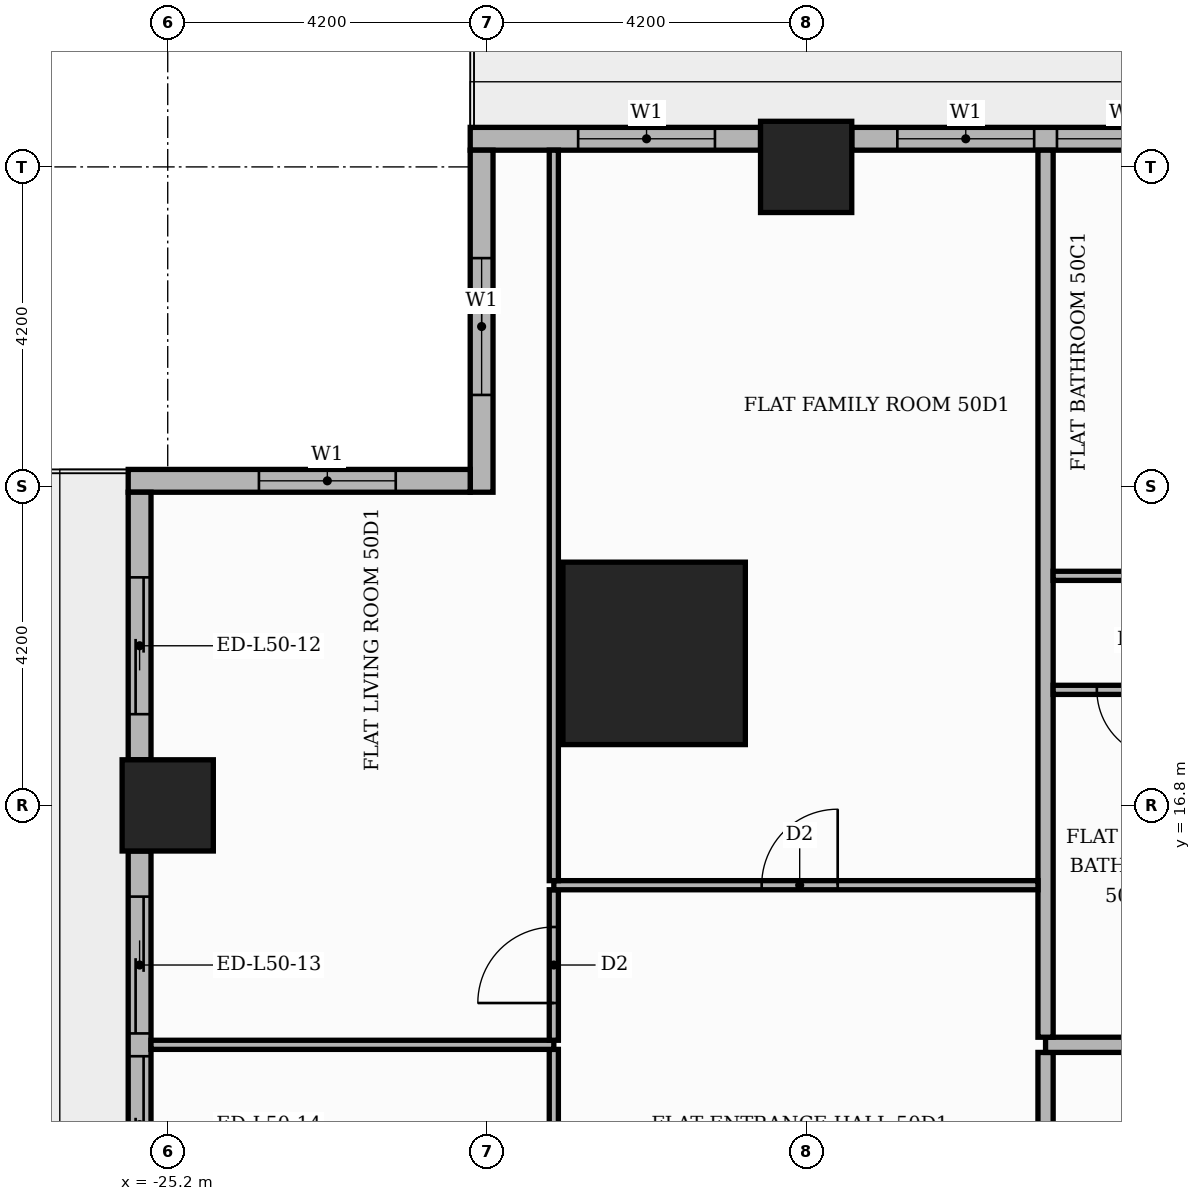
"""IFC4 building model, lengths in metres.
Left out: names, types, materials, properties, quantities, classifications, styles, units other than length and angle.
Written with IfcOpenShell. Run it as: python <this file> out.ifc"""

import sys

from ifc_helpers import new_model, si_unit, direction, frame, frame_2d, origin, origin_2d, place, context, subcontext, project, spatial, rectangle, extrude, element, fill, save


model = new_model("IFC4")
c1 = context("Model", 3, precision=1e-05, world=origin(), true_north=direction((0.0, 1.0)))
c2 = subcontext(c1, "Body", "Model", "MODEL_VIEW")
j1 = project(units=[si_unit("LENGTHUNIT", "METRE"), si_unit("PLANEANGLEUNIT", "RADIAN")], contexts=[c1])
p1 = place(None, origin())
s1 = spatial("IfcSite", under=j1, at=p1, CompositionType="ELEMENT")
p2 = place(p1, origin())
s2 = spatial("IfcBuilding", under=s1, at=p2, CompositionType="ELEMENT")
p3 = place(p2, frame((0.0, 0.0, 211.8)))
s3 = spatial("IfcBuildingStorey", under=s2, at=p3, CompositionType="ELEMENT", Elevation=211.8)
p4 = place(p3, frame((-18.8, 18.8, 0.0), z_axis=(0.0, 0.0, 1.0), x_axis=(1.0, 0.0, 0.0)))
e1 = element("IfcColumn", 1, at=p4, inside=s3, PredefinedType="COLUMN", context=c2, shape_type="SweptSolid", body=[
    extrude(rectangle(XDim=2.4, YDim=2.4, at=origin_2d()), origin(), (0.0, 0.0, 1.0), 3.9),
])
for number, where, z_axis, x_axis in (
    (2, (-16.8, 25.2, 0.0), (0.0, 0.0, 1.0), (1.0, 0.0, 0.0)),
    (3, (-25.2, 16.8, 0.0), (0.0, 0.0, 1.0), (1.0, 0.0, 0.0)),
):
    element("IfcColumn", number, at=place(p3, frame(where, z_axis=z_axis, x_axis=x_axis)), inside=s3, PredefinedType="COLUMN", context=c2, shape_type="SweptSolid", body=[
        extrude(rectangle(XDim=1.2, YDim=1.2, at=origin_2d()), origin(), (0.0, 0.0, 1.0), 3.9),
    ])
p5 = place(p3, frame((-9.0, 25.57, 0.0), z_axis=(0.0, 0.0, 1.0), x_axis=(-1.0, 0.0, 0.0)))
e4 = element("IfcWall", 4, at=p5, inside=s3, PredefinedType="STANDARD", context=c2, shape_type="SweptSolid", body=[
    extrude(rectangle(XDim=7.2, YDim=0.3, at=frame_2d((3.6, 0.0))), origin(), (0.0, 0.0, 1.0), 3.48),
])
p6 = place(p5, frame((0.6, 0.0, 0.9)))
e5 = element("IfcOpeningElement", 5, at=p6, cuts=e4, PredefinedType="OPENING", context=c2, shape_type="SweptSolid", body=[
    extrude(rectangle(XDim=1.8, YDim=2.1, at=frame_2d((0.9, 1.05))), frame((0.0, 0.16, 0.0), z_axis=(0.0, -1.0, 0.0), x_axis=(1.0, 0.0, 0.0)), (0.0, 0.0, 1.0), 0.32),
])
p7 = place(p5, frame((2.7, 0.0, 0.9)))
e6 = element("IfcOpeningElement", 6, at=p7, cuts=e4, PredefinedType="OPENING", context=c2, shape_type="SweptSolid", body=[
    extrude(rectangle(XDim=1.8, YDim=2.1, at=frame_2d((0.9, 1.05))), frame((0.0, 0.16, 0.0), z_axis=(0.0, -1.0, 0.0), x_axis=(1.0, 0.0, 0.0)), (0.0, 0.0, 1.0), 0.32),
])
p8 = place(p5, frame((4.8, 0.0, 0.9)))
e7 = element("IfcOpeningElement", 7, at=p8, cuts=e4, PredefinedType="OPENING", context=c2, shape_type="SweptSolid", body=[
    extrude(rectangle(XDim=1.8, YDim=2.1, at=frame_2d((0.9, 1.05))), frame((0.0, 0.16, 0.0), z_axis=(0.0, -1.0, 0.0), x_axis=(1.0, 0.0, 0.0)), (0.0, 0.0, 1.0), 0.32),
])
p9 = place(p3, frame((-17.4, 25.57, 0.0), z_axis=(0.0, 0.0, 1.0), x_axis=(-1.0, 0.0, 0.0)))
e8 = element("IfcWall", 8, at=p9, inside=s3, PredefinedType="STANDARD", context=c2, shape_type="SweptSolid", body=[
    extrude(rectangle(XDim=3.82, YDim=0.3, at=frame_2d((1.91, 0.0))), origin(), (0.0, 0.0, 1.0), 3.48),
])
p10 = place(p9, frame((0.6, 0.0, 0.9)))
e9 = element("IfcOpeningElement", 9, at=p10, cuts=e8, PredefinedType="OPENING", context=c2, shape_type="SweptSolid", body=[
    extrude(rectangle(XDim=1.8, YDim=2.1, at=frame_2d((0.9, 1.05))), frame((0.0, 0.16, 0.0), z_axis=(0.0, -1.0, 0.0), x_axis=(1.0, 0.0, 0.0)), (0.0, 0.0, 1.0), 0.32),
])
p11 = place(p3, frame((-21.07, 25.42, 0.0), z_axis=(0.0, 0.0, 1.0), x_axis=(0.0, -1.0, 0.0)))
e10 = element("IfcWall", 10, at=p11, inside=s3, PredefinedType="STANDARD", context=c2, shape_type="SweptSolid", body=[
    extrude(rectangle(XDim=4.5, YDim=0.3, at=frame_2d((2.25, 0.0))), origin(), (0.0, 0.0, 1.0), 3.48),
])
p12 = place(p11, frame((1.42, 0.0, 0.9)))
e11 = element("IfcOpeningElement", 11, at=p12, cuts=e10, PredefinedType="OPENING", context=c2, shape_type="SweptSolid", body=[
    extrude(rectangle(XDim=1.8, YDim=2.1, at=frame_2d((0.9, 1.05))), frame((0.0, 0.16, 0.0), z_axis=(0.0, -1.0, 0.0), x_axis=(1.0, 0.0, 0.0)), (0.0, 0.0, 1.0), 0.32),
])
p13 = place(p3, frame((-21.22, 21.07, 0.0), z_axis=(0.0, 0.0, 1.0), x_axis=(-1.0, 0.0, 0.0)))
e12 = element("IfcWall", 12, at=p13, inside=s3, PredefinedType="STANDARD", context=c2, shape_type="SweptSolid", body=[
    extrude(rectangle(XDim=4.5, YDim=0.3, at=frame_2d((2.25, 0.0))), origin(), (0.0, 0.0, 1.0), 3.48),
])
p14 = place(p13, frame((0.98, 0.0, 0.9)))
e13 = element("IfcOpeningElement", 13, at=p14, cuts=e12, PredefinedType="OPENING", context=c2, shape_type="SweptSolid", body=[
    extrude(rectangle(XDim=1.8, YDim=2.1, at=frame_2d((0.9, 1.05))), frame((0.0, 0.16, 0.0), z_axis=(0.0, -1.0, 0.0), x_axis=(1.0, 0.0, 0.0)), (0.0, 0.0, 1.0), 0.32),
])
p15 = place(p3, frame((-25.57, 20.92, 0.0), z_axis=(0.0, 0.0, 1.0), x_axis=(0.0, -1.0, 0.0)))
e14 = element("IfcWall", 14, at=p15, inside=s3, PredefinedType="STANDARD", context=c2, shape_type="SweptSolid", body=[
    extrude(rectangle(XDim=3.52, YDim=0.3, at=frame_2d((1.76, 0.0))), origin(), (0.0, 0.0, 1.0), 3.48),
])
p16 = place(p15, frame((1.12, 0.0, 0.0)))
e15 = element("IfcOpeningElement", 15, at=p16, cuts=e14, PredefinedType="OPENING", context=c2, shape_type="SweptSolid", body=[
    extrude(rectangle(XDim=1.8, YDim=2.4, at=frame_2d((0.9, 1.2))), frame((0.0, 0.16, 0.0), z_axis=(0.0, -1.0, 0.0), x_axis=(1.0, 0.0, 0.0)), (0.0, 0.0, 1.0), 0.32),
])
p17 = place(p3, frame((-25.57, 16.2, 0.0), z_axis=(0.0, 0.0, 1.0), x_axis=(0.0, -1.0, 0.0)))
e16 = element("IfcWall", 16, at=p17, inside=s3, PredefinedType="STANDARD", context=c2, shape_type="SweptSolid", body=[
    extrude(rectangle(XDim=7.2, YDim=0.3, at=frame_2d((3.6, 0.0))), origin(), (0.0, 0.0, 1.0), 3.48),
])
p18 = place(p17, frame((0.6, 0.0, 0.0)))
e17 = element("IfcOpeningElement", 17, at=p18, cuts=e16, PredefinedType="OPENING", context=c2, shape_type="SweptSolid", body=[
    extrude(rectangle(XDim=1.8, YDim=2.4, at=frame_2d((0.9, 1.2))), frame((0.0, 0.16, 0.0), z_axis=(0.0, -1.0, 0.0), x_axis=(1.0, 0.0, 0.0)), (0.0, 0.0, 1.0), 0.32),
])
p19 = place(p17, frame((2.7, 0.0, 0.0)))
e18 = element("IfcOpeningElement", 18, at=p19, cuts=e16, PredefinedType="OPENING", context=c2, shape_type="SweptSolid", body=[
    extrude(rectangle(XDim=1.8, YDim=2.4, at=frame_2d((0.9, 1.2))), frame((0.0, 0.16, 0.0), z_axis=(0.0, -1.0, 0.0), x_axis=(1.0, 0.0, 0.0)), (0.0, 0.0, 1.0), 0.32),
])
p20 = place(p17, frame((4.8, 0.0, 0.9)))
e19 = element("IfcOpeningElement", 19, at=p20, cuts=e16, PredefinedType="OPENING", context=c2, shape_type="SweptSolid", body=[
    extrude(rectangle(XDim=1.8, YDim=2.1, at=frame_2d((0.9, 1.05))), frame((0.0, 0.16, 0.0), z_axis=(0.0, -1.0, 0.0), x_axis=(1.0, 0.0, 0.0)), (0.0, 0.0, 1.0), 0.32),
])
p21 = place(p3, frame((-13.65, 5.35, 0.0), z_axis=(0.0, 0.0, 1.0), x_axis=(0.0, 1.0, 0.0)))
e20 = element("IfcWall", 20, at=p21, inside=s3, PredefinedType="PARTITIONING", context=c2, shape_type="SweptSolid", body=[
    extrude(rectangle(XDim=8.2, YDim=0.2, at=frame_2d((4.1, 0.0))), origin(), (0.0, 0.0, 1.0), 3.48),
])
p22 = place(p21, frame((5.65, 0.0, 0.0)))
e21 = element("IfcOpeningElement", 21, at=p22, cuts=e20, PredefinedType="OPENING", context=c2, shape_type="SweptSolid", body=[
    extrude(rectangle(XDim=1.1, YDim=2.4, at=frame_2d((0.55, 1.2))), frame((0.0, 0.11, 0.0), z_axis=(0.0, -1.0, 0.0), x_axis=(1.0, 0.0, 0.0)), (0.0, 0.0, 1.0), 0.22),
])
p23 = place(p3, frame((-20.12, 9.51, 0.0), z_axis=(0.0, 0.0, 1.0), x_axis=(0.0, 1.0, 0.0)))
e22 = element("IfcWall", 22, at=p23, inside=s3, PredefinedType="PARTITIONING", context=c2, shape_type="SweptSolid", body=[
    extrude(rectangle(XDim=4.08, YDim=0.12, at=frame_2d((2.04, 0.0))), origin(), (0.0, 0.0, 1.0), 3.48),
])
p24 = place(p23, frame((1.59, 0.0, 0.0)))
e23 = element("IfcOpeningElement", 23, at=p24, cuts=e22, PredefinedType="OPENING", context=c2, shape_type="SweptSolid", body=[
    extrude(rectangle(XDim=0.9, YDim=2.1, at=frame_2d((0.45, 1.05))), frame((0.0, 0.07, 0.0), z_axis=(0.0, -1.0, 0.0), x_axis=(1.0, 0.0, 0.0)), (0.0, 0.0, 1.0), 0.14),
])
p25 = place(p3, frame((-25.42, 13.65, 0.0), z_axis=(0.0, 0.0, 1.0), x_axis=(1.0, 0.0, 0.0)))
e24 = element("IfcWall", 24, at=p25, inside=s3, PredefinedType="PARTITIONING", context=c2, shape_type="SweptSolid", body=[
    extrude(rectangle(XDim=5.3, YDim=0.12, at=frame_2d((2.65, 0.0))), origin(), (0.0, 0.0, 1.0), 3.48),
])
p26 = place(p3, frame((-13.65, 13.65, 0.0), z_axis=(0.0, 0.0, 1.0), x_axis=(1.0, 0.0, 0.0)))
e25 = element("IfcWall", 25, at=p26, inside=s3, PredefinedType="PARTITIONING", context=c2, shape_type="SweptSolid", body=[
    extrude(rectangle(XDim=39.07, YDim=0.2, at=frame_2d((19.535, 0.0))), origin(), (0.0, 0.0, 1.0), 3.48),
])
p27 = place(p26, frame((23.6, 0.0, 0.0)))
e26 = element("IfcOpeningElement", 26, at=p27, cuts=e25, PredefinedType="OPENING", context=c2, shape_type="SweptSolid", body=[
    extrude(rectangle(XDim=1.1, YDim=2.4, at=frame_2d((0.55, 1.2))), frame((0.0, 0.11, 0.0), z_axis=(0.0, -1.0, 0.0), x_axis=(1.0, 0.0, 0.0)), (0.0, 0.0, 1.0), 0.22),
])
p28 = place(p3, frame((-20.12, 13.71, 0.0), z_axis=(0.0, 0.0, 1.0), x_axis=(0.0, 1.0, 0.0)))
e27 = element("IfcWall", 27, at=p28, inside=s3, PredefinedType="PARTITIONING", context=c2, shape_type="SweptSolid", body=[
    extrude(rectangle(XDim=1.98, YDim=0.12, at=frame_2d((0.99, 0.0))), origin(), (0.0, 0.0, 1.0), 3.48),
])
p29 = place(p28, frame((0.49, 0.0, 0.0)))
e28 = element("IfcOpeningElement", 28, at=p29, cuts=e27, PredefinedType="OPENING", context=c2, shape_type="SweptSolid", body=[
    extrude(rectangle(XDim=1.0, YDim=2.1, at=frame_2d((0.5, 1.05))), frame((0.0, 0.07, 0.0), z_axis=(0.0, -1.0, 0.0), x_axis=(1.0, 0.0, 0.0)), (0.0, 0.0, 1.0), 0.14),
])
p30 = place(p3, frame((-13.65, 13.75, 0.0), z_axis=(0.0, 0.0, 1.0), x_axis=(0.0, 1.0, 0.0)))
e29 = element("IfcWall", 29, at=p30, inside=s3, PredefinedType="PARTITIONING", context=c2, shape_type="SweptSolid", body=[
    extrude(rectangle(XDim=11.67, YDim=0.2, at=frame_2d((5.835, 0.0))), origin(), (0.0, 0.0, 1.0), 3.48),
])
p31 = place(p3, frame((-20.12, 15.75, 0.0), z_axis=(0.0, 0.0, 1.0), x_axis=(1.0, 0.0, 0.0)))
e30 = element("IfcWall", 30, at=p31, inside=s3, PredefinedType="PARTITIONING", context=c2, shape_type="SweptSolid", body=[
    extrude(rectangle(XDim=6.37, YDim=0.12, at=frame_2d((3.185, 0.0))), origin(), (0.0, 0.0, 1.0), 3.48),
])
p32 = place(p31, frame((2.735, 0.0, 0.0)))
e31 = element("IfcOpeningElement", 31, at=p32, cuts=e30, PredefinedType="OPENING", context=c2, shape_type="SweptSolid", body=[
    extrude(rectangle(XDim=1.0, YDim=2.1, at=frame_2d((0.5, 1.05))), frame((0.0, 0.07, 0.0), z_axis=(0.0, -1.0, 0.0), x_axis=(1.0, 0.0, 0.0)), (0.0, 0.0, 1.0), 0.14),
])
p33 = place(p3, frame((-20.12, 15.81, 0.0), z_axis=(0.0, 0.0, 1.0), x_axis=(0.0, 1.0, 0.0)))
e32 = element("IfcWall", 32, at=p33, inside=s3, PredefinedType="PARTITIONING", context=c2, shape_type="SweptSolid", body=[
    extrude(rectangle(XDim=9.61, YDim=0.12, at=frame_2d((4.805, 0.0))), origin(), (0.0, 0.0, 1.0), 3.48),
])
p34 = place(p3, frame((-13.55, 18.32, 0.0), z_axis=(0.0, 0.0, 1.0), x_axis=(1.0, 0.0, 0.0)))
e33 = element("IfcWall", 33, at=p34, inside=s3, PredefinedType="PARTITIONING", context=c2, shape_type="SweptSolid", body=[
    extrude(rectangle(XDim=20.9, YDim=0.12, at=frame_2d((10.45, 0.0))), origin(), (0.0, 0.0, 1.0), 3.48),
])
p35 = place(p34, frame((17.225, 0.0, 0.0)))
e34 = element("IfcOpeningElement", 34, at=p35, cuts=e33, PredefinedType="OPENING", context=c2, shape_type="SweptSolid", body=[
    extrude(rectangle(XDim=0.9, YDim=2.1, at=frame_2d((0.45, 1.05))), frame((0.0, 0.07, 0.0), z_axis=(0.0, -1.0, 0.0), x_axis=(1.0, 0.0, 0.0)), (0.0, 0.0, 1.0), 0.14),
])
p36 = place(p34, frame((11.9, 0.0, 0.0)))
e35 = element("IfcOpeningElement", 35, at=p36, cuts=e33, PredefinedType="OPENING", context=c2, shape_type="SweptSolid", body=[
    extrude(rectangle(XDim=0.9, YDim=2.1, at=frame_2d((0.45, 1.05))), frame((0.0, 0.07, 0.0), z_axis=(0.0, -1.0, 0.0), x_axis=(1.0, 0.0, 0.0)), (0.0, 0.0, 1.0), 0.14),
])
p37 = place(p34, frame((6.875, 0.0, 0.0)))
e36 = element("IfcOpeningElement", 36, at=p37, cuts=e33, PredefinedType="OPENING", context=c2, shape_type="SweptSolid", body=[
    extrude(rectangle(XDim=0.9, YDim=2.1, at=frame_2d((0.45, 1.05))), frame((0.0, 0.07, 0.0), z_axis=(0.0, -1.0, 0.0), x_axis=(1.0, 0.0, 0.0)), (0.0, 0.0, 1.0), 0.14),
])
p38 = place(p34, frame((2.825, 0.0, 0.0)))
e37 = element("IfcOpeningElement", 37, at=p38, cuts=e33, PredefinedType="OPENING", context=c2, shape_type="SweptSolid", body=[
    extrude(rectangle(XDim=0.9, YDim=2.1, at=frame_2d((0.45, 1.05))), frame((0.0, 0.07, 0.0), z_axis=(0.0, -1.0, 0.0), x_axis=(1.0, 0.0, 0.0)), (0.0, 0.0, 1.0), 0.14),
])
p39 = place(p34, frame((0.575, 0.0, 0.0)))
e38 = element("IfcOpeningElement", 38, at=p39, cuts=e33, PredefinedType="OPENING", context=c2, shape_type="SweptSolid", body=[
    extrude(rectangle(XDim=0.9, YDim=2.1, at=frame_2d((0.45, 1.05))), frame((0.0, 0.07, 0.0), z_axis=(0.0, -1.0, 0.0), x_axis=(1.0, 0.0, 0.0)), (0.0, 0.0, 1.0), 0.14),
])
p40 = place(p3, frame((-13.55, 19.82, 0.0), z_axis=(0.0, 0.0, 1.0), x_axis=(1.0, 0.0, 0.0)))
e39 = element("IfcWall", 39, at=p40, inside=s3, PredefinedType="PARTITIONING", context=c2, shape_type="SweptSolid", body=[
    extrude(rectangle(XDim=31.15, YDim=0.12, at=frame_2d((15.575, 0.0))), origin(), (0.0, 0.0, 1.0), 3.48),
])
p41 = place(p40, frame((25.65, 0.0, 0.0)))
e40 = element("IfcOpeningElement", 40, at=p41, cuts=e39, PredefinedType="OPENING", context=c2, shape_type="SweptSolid", body=[
    extrude(rectangle(XDim=1.0, YDim=2.1, at=frame_2d((0.5, 1.05))), frame((0.0, 0.07, 0.0), z_axis=(0.0, -1.0, 0.0), x_axis=(1.0, 0.0, 0.0)), (0.0, 0.0, 1.0), 0.14),
])
p42 = place(p40, frame((20.4, 0.0, 0.0)))
e41 = element("IfcOpeningElement", 41, at=p42, cuts=e39, PredefinedType="OPENING", context=c2, shape_type="SweptSolid", body=[
    extrude(rectangle(XDim=1.0, YDim=2.1, at=frame_2d((0.5, 1.05))), frame((0.0, 0.07, 0.0), z_axis=(0.0, -1.0, 0.0), x_axis=(1.0, 0.0, 0.0)), (0.0, 0.0, 1.0), 0.14),
])
p43 = place(p40, frame((13.1, 0.0, 0.0)))
e42 = element("IfcOpeningElement", 42, at=p43, cuts=e39, PredefinedType="OPENING", context=c2, shape_type="SweptSolid", body=[
    extrude(rectangle(XDim=0.9, YDim=2.1, at=frame_2d((0.45, 1.05))), frame((0.0, 0.07, 0.0), z_axis=(0.0, -1.0, 0.0), x_axis=(1.0, 0.0, 0.0)), (0.0, 0.0, 1.0), 0.14),
])
p44 = place(p40, frame((3.65, 0.0, 0.0)))
e43 = element("IfcOpeningElement", 43, at=p44, cuts=e39, PredefinedType="OPENING", context=c2, shape_type="SweptSolid", body=[
    extrude(rectangle(XDim=0.9, YDim=2.1, at=frame_2d((0.45, 1.05))), frame((0.0, 0.07, 0.0), z_axis=(0.0, -1.0, 0.0), x_axis=(1.0, 0.0, 0.0)), (0.0, 0.0, 1.0), 0.14),
])
p45 = place(p7, origin())
e44 = element("IfcWindow", 44, at=p45, inside=s3, PartitioningType="SINGLE_PANEL", PredefinedType="WINDOW", context=c2, shape_type="SweptSolid", body=[
    extrude(rectangle(XDim=1.8, YDim=2.1, at=frame_2d((0.9, 1.05))), frame((0.0, 0.03, 0.0), z_axis=(0.0, -1.0, 0.0), x_axis=(1.0, 0.0, 0.0)), (0.0, 0.0, 1.0), 0.06),
])
fill(e6, e44)
p46 = place(p8, origin())
e45 = element("IfcWindow", 45, at=p46, inside=s3, PartitioningType="SINGLE_PANEL", PredefinedType="WINDOW", context=c2, shape_type="SweptSolid", body=[
    extrude(rectangle(XDim=1.8, YDim=2.1, at=frame_2d((0.9, 1.05))), frame((0.0, 0.03, 0.0), z_axis=(0.0, -1.0, 0.0), x_axis=(1.0, 0.0, 0.0)), (0.0, 0.0, 1.0), 0.06),
])
fill(e7, e45)
p47 = place(p10, origin())
e46 = element("IfcWindow", 46, at=p47, inside=s3, PartitioningType="SINGLE_PANEL", PredefinedType="WINDOW", context=c2, shape_type="SweptSolid", body=[
    extrude(rectangle(XDim=1.8, YDim=2.1, at=frame_2d((0.9, 1.05))), frame((0.0, 0.03, 0.0), z_axis=(0.0, -1.0, 0.0), x_axis=(1.0, 0.0, 0.0)), (0.0, 0.0, 1.0), 0.06),
])
fill(e9, e46)
p48 = place(p12, origin())
e47 = element("IfcWindow", 47, at=p48, inside=s3, PartitioningType="SINGLE_PANEL", PredefinedType="WINDOW", context=c2, shape_type="SweptSolid", body=[
    extrude(rectangle(XDim=1.8, YDim=2.1, at=frame_2d((0.9, 1.05))), frame((0.0, 0.03, 0.0), z_axis=(0.0, -1.0, 0.0), x_axis=(1.0, 0.0, 0.0)), (0.0, 0.0, 1.0), 0.06),
])
fill(e11, e47)
p49 = place(p14, origin())
e48 = element("IfcWindow", 48, at=p49, inside=s3, PartitioningType="SINGLE_PANEL", PredefinedType="WINDOW", context=c2, shape_type="SweptSolid", body=[
    extrude(rectangle(XDim=1.8, YDim=2.1, at=frame_2d((0.9, 1.05))), frame((0.0, 0.03, 0.0), z_axis=(0.0, -1.0, 0.0), x_axis=(1.0, 0.0, 0.0)), (0.0, 0.0, 1.0), 0.06),
])
fill(e13, e48)
p50 = place(p16, origin())
e49 = element("IfcDoor", 49, at=p50, inside=s3, OperationType="SLIDING_TO_RIGHT", PredefinedType="DOOR", context=c2, shape_type="SweptSolid", body=[
    extrude(rectangle(XDim=1.8, YDim=2.4, at=frame_2d((0.9, 1.2))), frame((0.0, 0.025, 0.0), z_axis=(0.0, -1.0, 0.0), x_axis=(1.0, 0.0, 0.0)), (0.0, 0.0, 1.0), 0.05),
])
fill(e15, e49)
p51 = place(p18, origin())
e50 = element("IfcDoor", 50, at=p51, inside=s3, OperationType="SLIDING_TO_LEFT", PredefinedType="DOOR", context=c2, shape_type="SweptSolid", body=[
    extrude(rectangle(XDim=1.8, YDim=2.4, at=frame_2d((0.9, 1.2))), frame((0.0, 0.025, 0.0), z_axis=(0.0, -1.0, 0.0), x_axis=(1.0, 0.0, 0.0)), (0.0, 0.0, 1.0), 0.05),
])
fill(e17, e50)
p52 = place(p19, origin())
e51 = element("IfcDoor", 51, at=p52, inside=s3, OperationType="SLIDING_TO_RIGHT", PredefinedType="DOOR", context=c2, shape_type="SweptSolid", body=[
    extrude(rectangle(XDim=1.8, YDim=2.4, at=frame_2d((0.9, 1.2))), frame((0.0, 0.025, 0.0), z_axis=(0.0, -1.0, 0.0), x_axis=(1.0, 0.0, 0.0)), (0.0, 0.0, 1.0), 0.05),
])
fill(e18, e51)
p53 = place(p39, frame((0.9, 0.0, 0.0), z_axis=(0.0, 0.0, 1.0), x_axis=(-1.0, 0.0, 0.0)))
e52 = element("IfcDoor", 52, at=p53, inside=s3, OperationType="SINGLE_SWING_RIGHT", PredefinedType="DOOR", context=c2, shape_type="SweptSolid", body=[
    extrude(rectangle(XDim=0.9, YDim=2.1, at=frame_2d((0.45, 1.05))), frame((0.0, 0.025, 0.0), z_axis=(0.0, -1.0, 0.0), x_axis=(1.0, 0.0, 0.0)), (0.0, 0.0, 1.0), 0.05),
])
fill(e38, e52)
p54 = place(p32, origin())
e53 = element("IfcDoor", 53, at=p54, inside=s3, OperationType="SINGLE_SWING_RIGHT", PredefinedType="DOOR", context=c2, shape_type="SweptSolid", body=[
    extrude(rectangle(XDim=1.0, YDim=2.1, at=frame_2d((0.5, 1.05))), frame((0.0, 0.025, 0.0), z_axis=(0.0, -1.0, 0.0), x_axis=(1.0, 0.0, 0.0)), (0.0, 0.0, 1.0), 0.05),
])
fill(e31, e53)
p55 = place(p29, origin())
e54 = element("IfcDoor", 54, at=p55, inside=s3, OperationType="SINGLE_SWING_LEFT", PredefinedType="DOOR", context=c2, shape_type="SweptSolid", body=[
    extrude(rectangle(XDim=1.0, YDim=2.1, at=frame_2d((0.5, 1.05))), frame((0.0, 0.025, 0.0), z_axis=(0.0, -1.0, 0.0), x_axis=(1.0, 0.0, 0.0)), (0.0, 0.0, 1.0), 0.05),
])
fill(e28, e54)
save(model, sys.argv[1])
